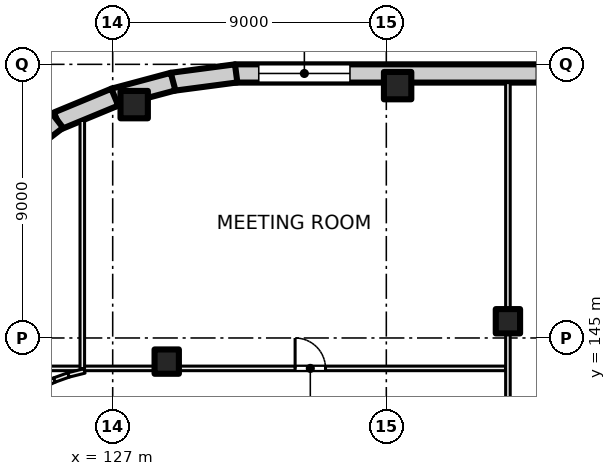
"""IFC4 building model, lengths in metres.
Left out: names, types, materials, properties, quantities, classifications, styles, units other than length and angle.
Written with IfcOpenShell. Run it as: python <this file> out.ifc"""

import sys

from ifc_helpers import new_model, si_unit, direction, frame, frame_2d, origin, origin_2d, place, context, subcontext, project, spatial, rectangle, extrude, element, fill, save


model = new_model("IFC4")
c1 = context("Model", 3, precision=1e-05, world=origin(), true_north=direction((0.0, 1.0)))
c2 = subcontext(c1, "Body", "Model", "MODEL_VIEW")
j1 = project(units=[si_unit("LENGTHUNIT", "METRE"), si_unit("PLANEANGLEUNIT", "RADIAN")], contexts=[c1])
p1 = place(None, origin())
s1 = spatial("IfcSite", under=j1, at=p1, CompositionType="ELEMENT")
p2 = place(p1, origin())
s2 = spatial("IfcBuilding", under=s1, at=p2, CompositionType="ELEMENT")
p3 = place(p2, frame((0.0, 0.0, 12.5)))
s3 = spatial("IfcBuildingStorey", under=s2, at=p3, CompositionType="ELEMENT", Elevation=12.5)
for number, where, z_axis, x_axis in (
    (1, (127.707, 152.675, 0.0), (0.0, 0.0, 1.0), (1.0, 0.0, 0.0)),
    (2, (136.372, 153.3, 0.0), (0.0, 0.0, 1.0), (1.0, 0.0, 0.0)),
):
    element("IfcColumn", number, at=place(p3, frame(where, z_axis=z_axis, x_axis=x_axis)), inside=s3, PredefinedType="COLUMN", context=c2, shape_type="SweptSolid", body=[
        extrude(rectangle(XDim=0.9, YDim=0.9, at=origin_2d()), origin(), (0.0, 0.0, 1.0), 5.0),
    ])
for number, where, z_axis, x_axis in (
    (3, (128.777, 144.223, 0.0), (0.0, 0.0, 1.0), (1.0, 0.0, 0.0)),
    (4, (140.0, 145.55, 0.0), (0.0, 0.0, 1.0), (1.0, 0.0, 0.0)),
):
    element("IfcColumn", number, at=place(p3, frame(where, z_axis=z_axis, x_axis=x_axis)), inside=s3, PredefinedType="COLUMN", context=c2, shape_type="SweptSolid", body=[
        extrude(rectangle(XDim=0.8, YDim=0.8, at=origin_2d()), origin(), (0.0, 0.0, 1.0), 5.0),
    ])
p4 = place(p3, frame((131.022, 153.7, 0.0), z_axis=(0.0, 0.0, 1.0), x_axis=(1.0, 0.0, 0.0)))
e5 = element("IfcWall", 5, at=p4, inside=s3, PredefinedType="SOLIDWALL", context=c2, shape_type="SweptSolid", body=[
    extrude(rectangle(XDim=31.957, YDim=0.6, at=frame_2d((15.978, 0.0))), origin(), (0.0, 0.0, 1.0), 4.6),
])
p5 = place(p4, frame((0.783, 0.0, 0.9)))
e6 = element("IfcOpeningElement", 6, at=p5, cuts=e5, PredefinedType="OPENING", context=c2, shape_type="SweptSolid", body=[
    extrude(rectangle(XDim=3.0, YDim=3.0, at=frame_2d((1.5, 1.5))), frame((0.0, 0.31, 0.0), z_axis=(0.0, -1.0, 0.0), x_axis=(1.0, 0.0, 0.0)), (0.0, 0.0, 1.0), 0.62),
])
p6 = place(p4, frame((9.913, 0.0, 0.9)))
e7 = element("IfcOpeningElement", 7, at=p6, cuts=e5, PredefinedType="OPENING", context=c2, shape_type="SweptSolid", body=[
    extrude(rectangle(XDim=3.0, YDim=3.0, at=frame_2d((1.5, 1.5))), frame((0.0, 0.31, 0.0), z_axis=(0.0, -1.0, 0.0), x_axis=(1.0, 0.0, 0.0)), (0.0, 0.0, 1.0), 0.62),
])
p7 = place(p4, frame((14.928, 0.0, 0.9)))
e8 = element("IfcOpeningElement", 8, at=p7, cuts=e5, PredefinedType="OPENING", context=c2, shape_type="SweptSolid", body=[
    extrude(rectangle(XDim=3.0, YDim=3.0, at=frame_2d((1.5, 1.5))), frame((0.0, 0.31, 0.0), z_axis=(0.0, -1.0, 0.0), x_axis=(1.0, 0.0, 0.0)), (0.0, 0.0, 1.0), 0.62),
])
p8 = place(p4, frame((19.043, 0.0, 0.9)))
e9 = element("IfcOpeningElement", 9, at=p8, cuts=e5, PredefinedType="OPENING", context=c2, shape_type="SweptSolid", body=[
    extrude(rectangle(XDim=3.0, YDim=3.0, at=frame_2d((1.5, 1.5))), frame((0.0, 0.31, 0.0), z_axis=(0.0, -1.0, 0.0), x_axis=(1.0, 0.0, 0.0)), (0.0, 0.0, 1.0), 0.62),
])
p9 = place(p4, frame((23.609, 0.0, 0.9)))
e10 = element("IfcOpeningElement", 10, at=p9, cuts=e5, PredefinedType="OPENING", context=c2, shape_type="SweptSolid", body=[
    extrude(rectangle(XDim=3.0, YDim=3.0, at=frame_2d((1.5, 1.5))), frame((0.0, 0.31, 0.0), z_axis=(0.0, -1.0, 0.0), x_axis=(1.0, 0.0, 0.0)), (0.0, 0.0, 1.0), 0.62),
])
p10 = place(p4, frame((27.724, 0.0, 0.9)))
e11 = element("IfcOpeningElement", 11, at=p10, cuts=e5, PredefinedType="OPENING", context=c2, shape_type="SweptSolid", body=[
    extrude(rectangle(XDim=3.0, YDim=3.0, at=frame_2d((1.5, 1.5))), frame((0.0, 0.31, 0.0), z_axis=(0.0, -1.0, 0.0), x_axis=(1.0, 0.0, 0.0)), (0.0, 0.0, 1.0), 0.62),
])
p11 = place(p3, frame((128.948, 153.424, 0.0), z_axis=(0.0, 0.0, 1.0), x_axis=(0.991440646942, 0.130558200013, 0.0)))
e12 = element("IfcWall", 12, at=p11, inside=s3, PredefinedType="SOLIDWALL", context=c2, shape_type="SweptSolid", body=[
    extrude(rectangle(XDim=2.132, YDim=0.6, at=frame_2d((1.066, 0.0))), origin(), (0.0, 0.0, 1.0), 4.6),
])
p12 = place(p3, frame((127.032, 152.908, 0.0), z_axis=(0.0, 0.0, 1.0), x_axis=(0.965929732323, 0.258804467146, 0.0)))
e13 = element("IfcWall", 13, at=p12, inside=s3, PredefinedType="SOLIDWALL", context=c2, shape_type="SweptSolid", body=[
    extrude(rectangle(XDim=2.022, YDim=0.6, at=frame_2d((1.011, 0.0))), origin(), (0.0, 0.0, 1.0), 4.6),
])
p13 = place(p3, frame((125.181, 152.14, 0.0), z_axis=(0.0, 0.0, 1.0), x_axis=(0.924021197839, 0.382341242798, 0.0)))
e14 = element("IfcWall", 14, at=p13, inside=s3, PredefinedType="SOLIDWALL", context=c2, shape_type="SweptSolid", body=[
    extrude(rectangle(XDim=2.044, YDim=0.6, at=frame_2d((1.022, 0.0))), origin(), (0.0, 0.0, 1.0), 4.6),
])
p14 = place(p3, frame((123.507, 150.865, 0.0), z_axis=(0.0, 0.0, 1.0), x_axis=(0.79313029079, 0.609052002567, 0.0)))
e15 = element("IfcWall", 15, at=p14, inside=s3, PredefinedType="SOLIDWALL", context=c2, shape_type="SweptSolid", body=[
    extrude(rectangle(XDim=2.114, YDim=0.6, at=frame_2d((1.057, 0.0))), origin(), (0.0, 0.0, 1.0), 4.6),
])
p15 = place(p3, frame((119.875, 144.0, 0.0), z_axis=(0.0, 0.0, 1.0), x_axis=(1.0, 0.0, 0.0)))
e16 = element("IfcWall", 16, at=p15, inside=s3, PredefinedType="PARTITIONING", context=c2, shape_type="SweptSolid", body=[
    extrude(rectangle(XDim=20.05, YDim=0.15, at=frame_2d((10.025, 0.0))), origin(), (0.0, 0.0, 1.0), 4.6),
])
p16 = place(p15, frame((13.125, 0.0, 0.0)))
e17 = element("IfcOpeningElement", 17, at=p16, cuts=e16, PredefinedType="OPENING", context=c2, shape_type="SweptSolid", body=[
    extrude(rectangle(XDim=1.0, YDim=2.1, at=frame_2d((0.5, 1.05))), frame((0.0, 0.085, 0.0), z_axis=(0.0, -1.0, 0.0), x_axis=(1.0, 0.0, 0.0)), (0.0, 0.0, 1.0), 0.17),
])
for number, where, z_axis, x_axis in (
    (18, (124.64, 143.408, 0.0), (0.0, 0.0, 1.0), (0.904, 0.428, 0.0)),
    (19, (125.084, 143.618, 0.0), (0.0, 0.0, 1.0), (0.941, 0.337, 0.0)),
):
    element("IfcWall", number, at=place(p3, frame(where, z_axis=z_axis, x_axis=x_axis)), inside=s3, PredefinedType="PARTITIONING", context=c2, shape_type="SweptSolid", body=[
        extrude(rectangle(XDim=0.498, YDim=0.15, at=frame_2d((0.249, 0.0))), origin(), (0.0, 0.0, 1.0), 4.6),
    ])
p17 = place(p3, frame((125.545, 143.784, 0.0), z_axis=(0.0, 0.0, 1.0), x_axis=(0.970116111764, 0.242641154168, 0.0)))
e20 = element("IfcWall", 20, at=p17, inside=s3, PredefinedType="PARTITIONING", context=c2, shape_type="SweptSolid", body=[
    extrude(rectangle(XDim=0.544, YDim=0.15, at=frame_2d((0.272, 0.0))), origin(), (0.0, 0.0, 1.0), 4.6),
])
p18 = place(p3, frame((126.0, 143.995, 0.0), z_axis=(0.0, 0.0, 1.0), x_axis=(0.0, 1.0, 0.0)))
e21 = element("IfcWall", 21, at=p18, inside=s3, PredefinedType="PARTITIONING", context=c2, shape_type="SweptSolid", body=[
    extrude(rectangle(XDim=8.159, YDim=0.15, at=frame_2d((4.08, 0.0))), origin(), (0.0, 0.0, 1.0), 4.6),
])
p19 = place(p3, frame((140.0, 139.0, 0.0), z_axis=(0.0, 0.0, 1.0), x_axis=(0.0, 1.0, 0.0)))
e22 = element("IfcWall", 22, at=p19, inside=s3, PredefinedType="PARTITIONING", context=c2, shape_type="SweptSolid", body=[
    extrude(rectangle(XDim=14.4, YDim=0.15, at=frame_2d((7.2, 0.0))), origin(), (0.0, 0.0, 1.0), 4.6),
])
p20 = place(p5, origin())
e23 = element("IfcWindow", 23, at=p20, inside=s3, PartitioningType="SINGLE_PANEL", PredefinedType="WINDOW", context=c2, shape_type="SweptSolid", body=[
    extrude(rectangle(XDim=3.0, YDim=3.0, at=frame_2d((1.5, 1.5))), frame((0.0, 0.03, 0.0), z_axis=(0.0, -1.0, 0.0), x_axis=(1.0, 0.0, 0.0)), (0.0, 0.0, 1.0), 0.06),
])
fill(e6, e23)
p21 = place(p16, origin())
e24 = element("IfcDoor", 24, at=p21, inside=s3, OperationType="SINGLE_SWING_LEFT", PredefinedType="DOOR", context=c2, shape_type="SweptSolid", body=[
    extrude(rectangle(XDim=1.0, YDim=2.1, at=frame_2d((0.5, 1.05))), frame((0.0, 0.025, 0.0), z_axis=(0.0, -1.0, 0.0), x_axis=(1.0, 0.0, 0.0)), (0.0, 0.0, 1.0), 0.05),
])
fill(e17, e24)
save(model, sys.argv[1])
